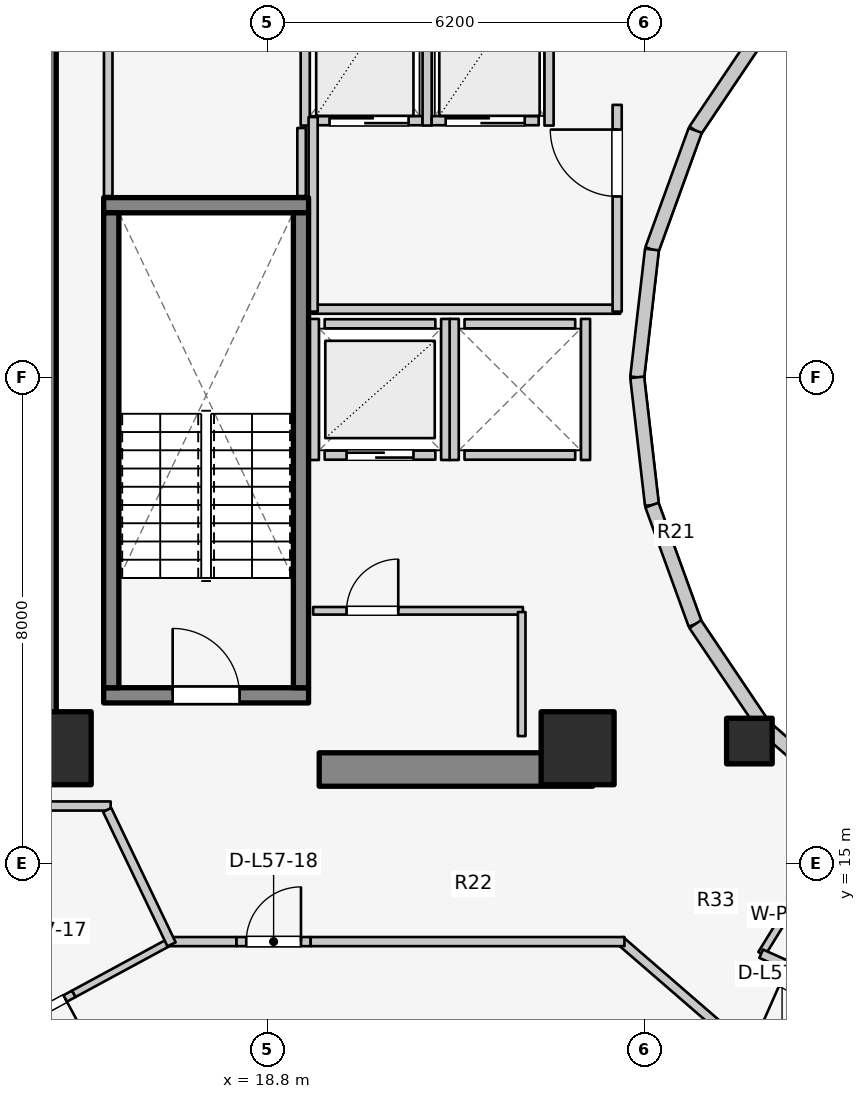
"""IFC4 building model, lengths in metres.
Left out: names, types, materials, properties, quantities, classifications, styles, units other than length and angle.
Written with IfcOpenShell. Run it as: python <this file> out.ifc"""

import sys

from ifc_helpers import new_model, si_unit, direction, frame, frame_2d, origin, origin_2d, place, context, subcontext, project, spatial, rectangle, extrude, element, fill, save


model = new_model("IFC4")
c1 = context("Model", 3, precision=1e-05, world=origin(), true_north=direction((0.0, 1.0)))
c2 = subcontext(c1, "Body", "Model", "MODEL_VIEW")
j1 = project(units=[si_unit("LENGTHUNIT", "METRE"), si_unit("PLANEANGLEUNIT", "RADIAN")], contexts=[c1])
p1 = place(None, origin())
s1 = spatial("IfcSite", under=j1, at=p1, CompositionType="ELEMENT")
p2 = place(p1, origin())
s2 = spatial("IfcBuilding", under=s1, at=p2, CompositionType="ELEMENT")
p3 = place(p2, frame((0.0, 0.0, 187.0)))
s3 = spatial("IfcBuildingStorey", under=s2, at=p3, CompositionType="ELEMENT", Elevation=187.0)
p4 = place(p3, frame((15.05, 17.05, 0.0), z_axis=(0.0, 0.0, 1.0), x_axis=(0.0, 1.0, 0.0)))
e1 = element("IfcWall", 1, at=p4, inside=s3, PredefinedType="SHEAR", context=c2, shape_type="SweptSolid", body=[
    extrude(rectangle(XDim=12.8, YDim=0.55, at=frame_2d((6.4, 0.0))), origin(), (0.0, 0.0, 1.0), 3.1),
])
p5 = place(p3, frame((19.65, 16.55, 0.0), z_axis=(0.0, 0.0, 1.0), x_axis=(1.0, 0.0, 0.0)))
e2 = element("IfcWall", 2, at=p5, inside=s3, PredefinedType="SHEAR", context=c2, shape_type="SweptSolid", body=[
    extrude(rectangle(XDim=4.5, YDim=0.55, at=frame_2d((2.25, 0.0))), origin(), (0.0, 0.0, 1.0), 3.1),
])
p6 = place(p3, frame((16.105, 17.77, 0.0), z_axis=(0.0, 0.0, 1.0), x_axis=(1.0, 0.0, 0.0)))
e3 = element("IfcWall", 3, at=p6, inside=s3, PredefinedType="SOLIDWALL", context=c2, shape_type="SweptSolid", body=[
    extrude(rectangle(XDim=3.37, YDim=0.25, at=frame_2d((1.685, 0.0))), origin(), (0.0, 0.0, 1.0), 3.1),
])
p7 = place(p6, frame((1.135, 0.0, 0.0)))
e4 = element("IfcOpeningElement", 4, at=p7, cuts=e3, PredefinedType="OPENING", context=c2, shape_type="SweptSolid", body=[
    extrude(rectangle(XDim=1.1, YDim=2.1, at=frame_2d((0.55, 1.05))), frame((0.0, 0.135, 0.0), z_axis=(0.0, -1.0, 0.0), x_axis=(1.0, 0.0, 0.0)), (0.0, 0.0, 1.0), 0.27),
])
p8 = place(p3, frame((16.105, 25.83, 0.0), z_axis=(0.0, 0.0, 1.0), x_axis=(1.0, 0.0, 0.0)))
e5 = element("IfcWall", 5, at=p8, inside=s3, PredefinedType="SOLIDWALL", context=c2, shape_type="SweptSolid", body=[
    extrude(rectangle(XDim=3.37, YDim=0.25, at=frame_2d((1.685, 0.0))), origin(), (0.0, 0.0, 1.0), 3.1),
])
for number, where, z_axis, x_axis in (
    (6, (16.23, 17.895, 0.0), (0.0, 0.0, 1.0), (0.0, 1.0, 0.0)),
    (7, (19.35, 17.895, 0.0), (0.0, 0.0, 1.0), (0.0, 1.0, 0.0)),
):
    element("IfcWall", number, at=place(p3, frame(where, z_axis=z_axis, x_axis=x_axis)), inside=s3, PredefinedType="SOLIDWALL", context=c2, shape_type="SweptSolid", body=[
        extrude(rectangle(XDim=7.81, YDim=0.25, at=frame_2d((3.905, 0.0))), origin(), (0.0, 0.0, 1.0), 3.1),
    ])
for number, where, z_axis, x_axis in (
    (8, (15.3, 16.9, 0.0), (0.0, 0.0, 1.0), (1.0, 0.0, 0.0)),
    (9, (23.9, 16.9, 0.0), (0.0, 0.0, 1.0), (1.0, 0.0, 0.0)),
):
    element("IfcColumn", number, at=place(p3, frame(where, z_axis=z_axis, x_axis=x_axis)), inside=s3, PredefinedType="COLUMN", context=c2, shape_type="SweptSolid", body=[
        extrude(rectangle(XDim=1.2, YDim=1.2, at=origin_2d()), origin(), (0.0, 0.0, 1.0), 3.1),
    ])
p9 = place(p3, frame((26.725, 17.018, 0.0), z_axis=(0.0, 0.0, 1.0), x_axis=(1.0, 0.0, 0.0)))
e10 = element("IfcColumn", 10, at=p9, inside=s3, PredefinedType="COLUMN", context=c2, shape_type="SweptSolid", body=[
    extrude(rectangle(XDim=0.75, YDim=0.75, at=origin_2d()), origin(), (0.0, 0.0, 1.0), 3.1),
])
p10 = place(p3, frame((26.965, 28.742, 0.0), z_axis=(0.0, 0.0, 1.0), x_axis=(-0.558197800898, -0.829707909492, 0.0)))
e11 = element("IfcWall", 11, at=p10, inside=s3, PredefinedType="STANDARD", context=c2, shape_type="SweptSolid", body=[
    extrude(rectangle(XDim=2.027, YDim=0.23, at=frame_2d((1.013, 0.0))), origin(), (0.0, 0.0, 1.0), 1.22),
])
p11 = place(p3, frame((25.834, 27.06, 0.0), z_axis=(0.0, 0.0, 1.0), x_axis=(-0.341423187295, -0.93990968033, 0.0)))
e12 = element("IfcWall", 12, at=p11, inside=s3, PredefinedType="STANDARD", context=c2, shape_type="SweptSolid", body=[
    extrude(rectangle(XDim=2.084, YDim=0.23, at=frame_2d((1.042, 0.0))), origin(), (0.0, 0.0, 1.0), 2.56),
])
for number, where, z_axis, x_axis in (
    (13, (25.123, 25.102, 0.0), (0.0, 0.0, 1.0), (-0.115, -0.993, 0.0)),
    (14, (24.88, 23.0, 0.0), (0.0, 0.0, 1.0), (0.115, -0.993, 0.0)),
):
    element("IfcWall", number, at=place(p3, frame(where, z_axis=z_axis, x_axis=x_axis)), inside=s3, PredefinedType="STANDARD", context=c2, shape_type="SweptSolid", body=[
        extrude(rectangle(XDim=2.115, YDim=0.23, at=frame_2d((1.058, 0.0))), origin(), (0.0, 0.0, 1.0), 2.56),
    ])
p12 = place(p3, frame((25.123, 20.898, 0.0), z_axis=(0.0, 0.0, 1.0), x_axis=(0.341423187295, -0.93990968033, 0.0)))
e15 = element("IfcWall", 15, at=p12, inside=s3, PredefinedType="STANDARD", context=c2, shape_type="SweptSolid", body=[
    extrude(rectangle(XDim=2.084, YDim=0.23, at=frame_2d((1.042, 0.0))), origin(), (0.0, 0.0, 1.0), 2.56),
])
p13 = place(p3, frame((25.834, 18.94, 0.0), z_axis=(0.0, 0.0, 1.0), x_axis=(0.558197800898, -0.829707909492, 0.0)))
e16 = element("IfcWall", 16, at=p13, inside=s3, PredefinedType="STANDARD", context=c2, shape_type="SweptSolid", body=[
    extrude(rectangle(XDim=2.027, YDim=0.23, at=frame_2d((1.013, 0.0))), origin(), (0.0, 0.0, 1.0), 1.22),
])
p14 = place(p3, frame((26.965, 17.258, 0.0), z_axis=(0.0, 0.0, 1.0), x_axis=(0.752576694707, -0.658504607869, 0.0)))
e17 = element("IfcWall", 17, at=p14, inside=s3, PredefinedType="STANDARD", context=c2, shape_type="SweptSolid", body=[
    extrude(rectangle(XDim=1.959, YDim=0.23, at=frame_2d((0.98, 0.0))), origin(), (0.0, 0.0, 1.0), 1.22),
])
p15 = place(p3, frame((12.381, 13.716, 0.0), z_axis=(0.0, 0.0, 1.0), x_axis=(0.727667301037, -0.68593024354, 0.0)))
e18 = element("IfcWall", 18, at=p15, inside=s3, PredefinedType="STANDARD", context=c2, shape_type="SweptSolid", body=[
    extrude(rectangle(XDim=4.604, YDim=0.26, at=frame_2d((2.302, 0.0))), origin(), (0.0, 0.0, 1.0), 1.22),
])
p16 = place(p15, frame((0.631, 0.0, 0.15)))
e19 = element("IfcOpeningElement", 19, at=p16, cuts=e18, PredefinedType="OPENING", context=c2, shape_type="SweptSolid", body=[
    extrude(rectangle(XDim=1.2, YDim=0.9, at=frame_2d((0.6, 0.45))), frame((0.0, 0.14, 0.0), z_axis=(0.0, -1.0, 0.0), x_axis=(1.0, 0.0, 0.0)), (0.0, 0.0, 1.0), 0.28),
])
p17 = place(p3, frame((19.74, 21.72, 0.0), z_axis=(0.0, 0.0, 1.0), x_axis=(1.0, 0.0, 0.0)))
e20 = element("IfcWall", 20, at=p17, inside=s3, PredefinedType="SOLIDWALL", context=c2, shape_type="SweptSolid", body=[
    extrude(rectangle(XDim=1.82, YDim=0.15, at=frame_2d((0.91, 0.0))), origin(), (0.0, 0.0, 1.0), 2.575),
])
p18 = place(p17, frame((0.36, 0.0, 0.0)))
e21 = element("IfcOpeningElement", 21, at=p18, cuts=e20, PredefinedType="OPENING", context=c2, shape_type="SweptSolid", body=[
    extrude(rectangle(XDim=1.1, YDim=2.1, at=frame_2d((0.55, 1.05))), frame((0.0, 0.085, 0.0), z_axis=(0.0, -1.0, 0.0), x_axis=(1.0, 0.0, 0.0)), (0.0, 0.0, 1.0), 0.17),
])
p19 = place(p3, frame((19.74, 23.88, 0.0), z_axis=(0.0, 0.0, 1.0), x_axis=(1.0, 0.0, 0.0)))
e22 = element("IfcWall", 22, at=p19, inside=s3, PredefinedType="SOLIDWALL", context=c2, shape_type="SweptSolid", body=[
    extrude(rectangle(XDim=1.82, YDim=0.15, at=frame_2d((0.91, 0.0))), origin(), (0.0, 0.0, 1.0), 2.575),
])
for number, where, z_axis, x_axis in (
    (23, (19.57, 21.64, 0.0), (0.0, 0.0, 1.0), (0.0, 1.0, 0.0)),
    (24, (21.73, 21.64, 0.0), (0.0, 0.0, 1.0), (0.0, 1.0, 0.0)),
):
    element("IfcWall", number, at=place(p3, frame(where, z_axis=z_axis, x_axis=x_axis)), inside=s3, PredefinedType="SOLIDWALL", context=c2, shape_type="SweptSolid", body=[
        extrude(rectangle(XDim=2.32, YDim=0.15, at=frame_2d((1.16, 0.0))), origin(), (0.0, 0.0, 1.0), 2.575),
    ])
for number, where, z_axis, x_axis in (
    (25, (22.04, 21.72, 0.0), (0.0, 0.0, 1.0), (1.0, 0.0, 0.0)),
    (26, (22.04, 23.88, 0.0), (0.0, 0.0, 1.0), (1.0, 0.0, 0.0)),
):
    element("IfcWall", number, at=place(p3, frame(where, z_axis=z_axis, x_axis=x_axis)), inside=s3, PredefinedType="SOLIDWALL", context=c2, shape_type="SweptSolid", body=[
        extrude(rectangle(XDim=1.82, YDim=0.15, at=frame_2d((0.91, 0.0))), origin(), (0.0, 0.0, 1.0), 2.12),
    ])
p20 = place(p3, frame((21.87, 21.64, 0.0), z_axis=(0.0, 0.0, 1.0), x_axis=(0.0, 1.0, 0.0)))
e27 = element("IfcWall", 27, at=p20, inside=s3, PredefinedType="SOLIDWALL", context=c2, shape_type="SweptSolid", body=[
    extrude(rectangle(XDim=2.32, YDim=0.15, at=frame_2d((1.16, 0.0))), origin(), (0.0, 0.0, 1.0), 2.575),
])
p21 = place(p3, frame((24.03, 21.64, 0.0), z_axis=(0.0, 0.0, 1.0), x_axis=(0.0, 1.0, 0.0)))
e28 = element("IfcWall", 28, at=p21, inside=s3, PredefinedType="SOLIDWALL", context=c2, shape_type="SweptSolid", body=[
    extrude(rectangle(XDim=2.32, YDim=0.15, at=frame_2d((1.16, 0.0))), origin(), (0.0, 0.0, 1.0), 2.12),
])
p22 = place(p3, frame((19.59, 27.22, 0.0), z_axis=(0.0, 0.0, 1.0), x_axis=(1.0, 0.0, 0.0)))
e29 = element("IfcWall", 29, at=p22, inside=s3, PredefinedType="SOLIDWALL", context=c2, shape_type="SweptSolid", body=[
    extrude(rectangle(XDim=1.76, YDim=0.15, at=frame_2d((0.88, 0.0))), origin(), (0.0, 0.0, 1.0), 2.575),
])
p23 = place(p22, frame((0.23, 0.0, 0.0)))
e30 = element("IfcOpeningElement", 30, at=p23, cuts=e29, PredefinedType="OPENING", context=c2, shape_type="SweptSolid", body=[
    extrude(rectangle(XDim=1.3, YDim=2.1, at=frame_2d((0.65, 1.05))), frame((0.0, 0.085, 0.0), z_axis=(0.0, -1.0, 0.0), x_axis=(1.0, 0.0, 0.0)), (0.0, 0.0, 1.0), 0.17),
])
for number, where, z_axis, x_axis in (
    (31, (19.42, 27.14, 0.0), (0.0, 0.0, 1.0), (0.0, 1.0, 0.0)),
    (32, (21.425, 27.14, 0.0), (0.0, 0.0, 1.0), (0.0, 1.0, 0.0)),
):
    element("IfcWall", number, at=place(p3, frame(where, z_axis=z_axis, x_axis=x_axis)), inside=s3, PredefinedType="SOLIDWALL", context=c2, shape_type="SweptSolid", body=[
        extrude(rectangle(XDim=2.72, YDim=0.15, at=frame_2d((1.36, 0.0))), origin(), (0.0, 0.0, 1.0), 2.575),
    ])
p24 = place(p3, frame((21.5, 27.22, 0.0), z_axis=(0.0, 0.0, 1.0), x_axis=(1.0, 0.0, 0.0)))
e33 = element("IfcWall", 33, at=p24, inside=s3, PredefinedType="SOLIDWALL", context=c2, shape_type="SweptSolid", body=[
    extrude(rectangle(XDim=1.76, YDim=0.15, at=frame_2d((0.88, 0.0))), origin(), (0.0, 0.0, 1.0), 2.575),
])
p25 = place(p24, frame((0.23, 0.0, 0.0)))
e34 = element("IfcOpeningElement", 34, at=p25, cuts=e33, PredefinedType="OPENING", context=c2, shape_type="SweptSolid", body=[
    extrude(rectangle(XDim=1.3, YDim=2.1, at=frame_2d((0.65, 1.05))), frame((0.0, 0.085, 0.0), z_axis=(0.0, -1.0, 0.0), x_axis=(1.0, 0.0, 0.0)), (0.0, 0.0, 1.0), 0.17),
])
p26 = place(p3, frame((23.43, 27.14, 0.0), z_axis=(0.0, 0.0, 1.0), x_axis=(0.0, 1.0, 0.0)))
e35 = element("IfcWall", 35, at=p26, inside=s3, PredefinedType="SOLIDWALL", context=c2, shape_type="SweptSolid", body=[
    extrude(rectangle(XDim=2.72, YDim=0.15, at=frame_2d((1.36, 0.0))), origin(), (0.0, 0.0, 1.0), 2.575),
])
p27 = place(p3, frame((19.52, 24.12, 0.0), z_axis=(0.0, 0.0, 1.0), x_axis=(1.0, 0.0, 0.0)))
e36 = element("IfcWall", 36, at=p27, inside=s3, PredefinedType="PARTITIONING", context=c2, shape_type="SweptSolid", body=[
    extrude(rectangle(XDim=5.08, YDim=0.15, at=frame_2d((2.54, 0.0))), origin(), (0.0, 0.0, 1.0), 2.12),
])
p28 = place(p3, frame((19.55, 24.08, 0.0), z_axis=(0.0, 0.0, 1.0), x_axis=(0.0, 1.0, 0.0)))
e37 = element("IfcWall", 37, at=p28, inside=s3, PredefinedType="PARTITIONING", context=c2, shape_type="SweptSolid", body=[
    extrude(rectangle(XDim=3.2, YDim=0.15, at=frame_2d((1.6, 0.0))), origin(), (0.0, 0.0, 1.0), 2.575),
])
p29 = place(p3, frame((24.55, 24.08, 0.0), z_axis=(0.0, 0.0, 1.0), x_axis=(0.0, 1.0, 0.0)))
e38 = element("IfcWall", 38, at=p29, inside=s3, PredefinedType="PARTITIONING", context=c2, shape_type="SweptSolid", body=[
    extrude(rectangle(XDim=3.4, YDim=0.15, at=frame_2d((1.7, 0.0))), origin(), (0.0, 0.0, 1.0), 2.575),
])
p30 = place(p29, frame((1.894, 0.0, 0.0)))
e39 = element("IfcOpeningElement", 39, at=p30, cuts=e38, PredefinedType="OPENING", context=c2, shape_type="SweptSolid", body=[
    extrude(rectangle(XDim=1.1, YDim=2.1, at=frame_2d((0.55, 1.05))), frame((0.0, 0.085, 0.0), z_axis=(0.0, -1.0, 0.0), x_axis=(1.0, 0.0, 0.0)), (0.0, 0.0, 1.0), 0.17),
])
p31 = place(p3, frame((19.55, 19.16, 0.0), z_axis=(0.0, 0.0, 1.0), x_axis=(1.0, 0.0, 0.0)))
e40 = element("IfcWall", 40, at=p31, inside=s3, PredefinedType="PARTITIONING", context=c2, shape_type="SweptSolid", body=[
    extrude(rectangle(XDim=3.45, YDim=0.125, at=frame_2d((1.725, 0.0))), origin(), (0.0, 0.0, 1.0), 2.12),
])
p32 = place(p31, frame((0.55, 0.0, 0.0)))
e41 = element("IfcOpeningElement", 41, at=p32, cuts=e40, PredefinedType="OPENING", context=c2, shape_type="SweptSolid", body=[
    extrude(rectangle(XDim=0.85, YDim=2.05, at=frame_2d((0.425, 1.025))), frame((0.0, 0.073, 0.0), z_axis=(0.0, -1.0, 0.0), x_axis=(1.0, 0.0, 0.0)), (0.0, 0.0, 1.0), 0.145),
])
p33 = place(p3, frame((22.98, 17.1, 0.0), z_axis=(0.0, 0.0, 1.0), x_axis=(0.0, 1.0, 0.0)))
e42 = element("IfcWall", 42, at=p33, inside=s3, PredefinedType="PARTITIONING", context=c2, shape_type="SweptSolid", body=[
    extrude(rectangle(XDim=2.04, YDim=0.125, at=frame_2d((1.02, 0.0))), origin(), (0.0, 0.0, 1.0), 2.575),
])
p34 = place(p3, frame((16.18, 25.98, 0.0), z_axis=(0.0, 0.0, 1.0), x_axis=(0.0, 1.0, 0.0)))
e43 = element("IfcWall", 43, at=p34, inside=s3, PredefinedType="PLUMBINGWALL", context=c2, shape_type="SweptSolid", body=[
    extrude(rectangle(XDim=3.88, YDim=0.14, at=frame_2d((1.94, 0.0))), origin(), (0.0, 0.0, 1.0), 2.575),
])
p35 = place(p3, frame((19.36, 25.98, 0.0), z_axis=(0.0, 0.0, 1.0), x_axis=(0.0, 1.0, 0.0)))
e44 = element("IfcWall", 44, at=p35, inside=s3, PredefinedType="PLUMBINGWALL", context=c2, shape_type="SweptSolid", body=[
    extrude(rectangle(XDim=1.12, YDim=0.14, at=frame_2d((0.56, 0.0))), origin(), (0.0, 0.0, 1.0), 2.575),
])
p36 = place(p3, frame((10.96, 15.95, 0.0), z_axis=(0.0, 0.0, 1.0), x_axis=(1.0, 0.0, 0.0)))
e45 = element("IfcWall", 45, at=p36, inside=s3, PredefinedType="PARTITIONING", context=c2, shape_type="SweptSolid", body=[
    extrude(rectangle(XDim=5.26, YDim=0.15, at=frame_2d((2.63, 0.0))), origin(), (0.0, 0.0, 1.0), 1.22),
])
p37 = place(p3, frame((17.244, 13.744, 0.0), z_axis=(0.0, 0.0, 1.0), x_axis=(-0.879399863451, -0.476083900339, 0.0)))
e46 = element("IfcWall", 46, at=p37, inside=s3, PredefinedType="MOVABLE", context=c2, shape_type="SweptSolid", body=[
    extrude(rectangle(XDim=1.855, YDim=0.12, at=frame_2d((0.928, 0.0))), origin(), (0.0, 0.0, 1.0), 1.22),
])
p38 = place(p3, frame((15.612, 12.861, 0.0), z_axis=(0.0, 0.0, 1.0), x_axis=(-0.879342939039, -0.476189033433, 0.0)))
e47 = element("IfcWall", 47, at=p38, inside=s3, PredefinedType="MOVABLE", context=c2, shape_type="SweptSolid", body=[
    extrude(rectangle(XDim=1.17, YDim=0.12, at=frame_2d((0.585, 0.0))), origin(), (0.0, 0.0, 1.0), 2.11),
])
p39 = place(p38, frame((0.16, 0.0, 0.0)))
e48 = element("IfcOpeningElement", 48, at=p39, cuts=e47, PredefinedType="OPENING", context=c2, shape_type="SweptSolid", body=[
    extrude(rectangle(XDim=0.85, YDim=2.05, at=frame_2d((0.425, 1.025))), frame((0.0, 0.07, 0.0), z_axis=(0.0, -1.0, 0.0), x_axis=(1.0, 0.0, 0.0)), (0.0, 0.0, 1.0), 0.14),
])
p40 = place(p3, frame((26.193, 12.358, 0.0), z_axis=(0.0, 0.0, 1.0), x_axis=(-0.756055312247, 0.654507727092, 0.0)))
e49 = element("IfcWall", 49, at=p40, inside=s3, PredefinedType="PARTITIONING", context=c2, shape_type="SweptSolid", body=[
    extrude(rectangle(XDim=2.111, YDim=0.15, at=frame_2d((1.055, 0.0))), origin(), (0.0, 0.0, 1.0), 1.22),
])
p41 = place(p3, frame((17.15, 13.72, 0.0), z_axis=(0.0, 0.0, 1.0), x_axis=(1.0, 0.0, 0.0)))
e50 = element("IfcWall", 50, at=p41, inside=s3, PredefinedType="PARTITIONING", context=c2, shape_type="SweptSolid", body=[
    extrude(rectangle(XDim=1.14, YDim=0.15, at=frame_2d((0.57, 0.0))), origin(), (0.0, 0.0, 1.0), 2.575),
])
p42 = place(p3, frame((18.29, 13.72, 0.0), z_axis=(0.0, 0.0, 1.0), x_axis=(1.0, 0.0, 0.0)))
e51 = element("IfcWall", 51, at=p42, inside=s3, PredefinedType="PARTITIONING", context=c2, shape_type="SweptSolid", body=[
    extrude(rectangle(XDim=1.22, YDim=0.15, at=frame_2d((0.61, 0.0))), origin(), (0.0, 0.0, 1.0), 2.575),
])
p43 = place(p42, frame((0.16, 0.0, 0.0)))
e52 = element("IfcOpeningElement", 52, at=p43, cuts=e51, PredefinedType="OPENING", context=c2, shape_type="SweptSolid", body=[
    extrude(rectangle(XDim=0.9, YDim=2.1, at=frame_2d((0.45, 1.05))), frame((0.0, 0.085, 0.0), z_axis=(0.0, -1.0, 0.0), x_axis=(1.0, 0.0, 0.0)), (0.0, 0.0, 1.0), 0.17),
])
p44 = place(p3, frame((19.51, 13.72, 0.0), z_axis=(0.0, 0.0, 1.0), x_axis=(1.0, 0.0, 0.0)))
e53 = element("IfcWall", 53, at=p44, inside=s3, PredefinedType="PARTITIONING", context=c2, shape_type="SweptSolid", body=[
    extrude(rectangle(XDim=5.16, YDim=0.15, at=frame_2d((2.58, 0.0))), origin(), (0.0, 0.0, 1.0), 1.22),
])
p45 = place(p3, frame((17.222, 13.675, 0.0), z_axis=(0.0, 0.0, 1.0), x_axis=(-0.431973389813, 0.901886351207, 0.0)))
e54 = element("IfcWall", 54, at=p45, inside=s3, PredefinedType="PARTITIONING", context=c2, shape_type="SweptSolid", body=[
    extrude(rectangle(XDim=2.452, YDim=0.15, at=frame_2d((1.226, 0.0))), origin(), (0.0, 0.0, 1.0), 2.575),
])
p46 = place(p3, frame((28.45, 15.985, 0.0), z_axis=(0.0, 0.0, 1.0), x_axis=(-0.525627246902, -0.850714991824, 0.0)))
e55 = element("IfcWall", 55, at=p46, inside=s3, PredefinedType="PARTITIONING", context=c2, shape_type="SweptSolid", body=[
    extrude(rectangle(XDim=2.901, YDim=0.125, at=frame_2d((1.451, 0.0))), origin(), (0.0, 0.0, 1.0), 1.22),
])
p47 = place(p3, frame((26.919, 13.521, 0.0), z_axis=(0.0, 0.0, 1.0), x_axis=(0.912888568324, -0.408208845842, 0.0)))
e56 = element("IfcWall", 56, at=p47, inside=s3, PredefinedType="PARTITIONING", context=c2, shape_type="SweptSolid", body=[
    extrude(rectangle(XDim=2.69, YDim=0.15, at=frame_2d((1.345, 0.0))), origin(), (0.0, 0.0, 1.0), 1.22),
])
p48 = place(p7, origin())
e57 = element("IfcDoor", 57, at=p48, inside=s3, OperationType="SINGLE_SWING_LEFT", PredefinedType="DOOR", context=c2, shape_type="SweptSolid", body=[
    extrude(rectangle(XDim=1.1, YDim=2.1, at=frame_2d((0.55, 1.05))), frame((0.0, 0.025, 0.0), z_axis=(0.0, -1.0, 0.0), x_axis=(1.0, 0.0, 0.0)), (0.0, 0.0, 1.0), 0.05),
])
fill(e4, e57)
p49 = place(p18, origin())
e58 = element("IfcDoor", 58, at=p49, inside=s3, OperationType="DOUBLE_DOOR_SLIDING", PredefinedType="DOOR", context=c2, shape_type="SweptSolid", body=[
    extrude(rectangle(XDim=1.1, YDim=2.1, at=frame_2d((0.55, 1.05))), frame((0.0, 0.025, 0.0), z_axis=(0.0, -1.0, 0.0), x_axis=(1.0, 0.0, 0.0)), (0.0, 0.0, 1.0), 0.05),
])
fill(e21, e58)
p50 = place(p23, origin())
e59 = element("IfcDoor", 59, at=p50, inside=s3, OperationType="DOUBLE_DOOR_SLIDING", PredefinedType="DOOR", context=c2, shape_type="SweptSolid", body=[
    extrude(rectangle(XDim=1.3, YDim=2.1, at=frame_2d((0.65, 1.05))), frame((0.0, 0.025, 0.0), z_axis=(0.0, -1.0, 0.0), x_axis=(1.0, 0.0, 0.0)), (0.0, 0.0, 1.0), 0.05),
])
fill(e30, e59)
p51 = place(p25, origin())
e60 = element("IfcDoor", 60, at=p51, inside=s3, OperationType="DOUBLE_DOOR_SLIDING", PredefinedType="DOOR", context=c2, shape_type="SweptSolid", body=[
    extrude(rectangle(XDim=1.3, YDim=2.1, at=frame_2d((0.65, 1.05))), frame((0.0, 0.025, 0.0), z_axis=(0.0, -1.0, 0.0), x_axis=(1.0, 0.0, 0.0)), (0.0, 0.0, 1.0), 0.05),
])
fill(e34, e60)
p52 = place(p30, origin())
e61 = element("IfcDoor", 61, at=p52, inside=s3, OperationType="SINGLE_SWING_RIGHT", PredefinedType="DOOR", context=c2, shape_type="SweptSolid", body=[
    extrude(rectangle(XDim=1.1, YDim=2.1, at=frame_2d((0.55, 1.05))), frame((0.0, 0.025, 0.0), z_axis=(0.0, -1.0, 0.0), x_axis=(1.0, 0.0, 0.0)), (0.0, 0.0, 1.0), 0.05),
])
fill(e39, e61)
p53 = place(p32, origin())
e62 = element("IfcDoor", 62, at=p53, inside=s3, OperationType="SINGLE_SWING_RIGHT", PredefinedType="DOOR", context=c2, shape_type="SweptSolid", body=[
    extrude(rectangle(XDim=0.85, YDim=2.05, at=frame_2d((0.425, 1.025))), frame((0.0, 0.025, 0.0), z_axis=(0.0, -1.0, 0.0), x_axis=(1.0, 0.0, 0.0)), (0.0, 0.0, 1.0), 0.05),
])
fill(e41, e62)
p54 = place(p39, origin())
e63 = element("IfcDoor", 63, at=p54, inside=s3, OperationType="SINGLE_SWING_LEFT", PredefinedType="DOOR", context=c2, shape_type="SweptSolid", body=[
    extrude(rectangle(XDim=0.85, YDim=2.05, at=frame_2d((0.425, 1.025))), frame((0.0, 0.025, 0.0), z_axis=(0.0, -1.0, 0.0), x_axis=(1.0, 0.0, 0.0)), (0.0, 0.0, 1.0), 0.05),
])
fill(e48, e63)
p55 = place(p43, origin())
e64 = element("IfcDoor", 64, at=p55, inside=s3, OperationType="SINGLE_SWING_RIGHT", PredefinedType="DOOR", context=c2, shape_type="SweptSolid", body=[
    extrude(rectangle(XDim=0.9, YDim=2.1, at=frame_2d((0.45, 1.05))), frame((0.0, 0.025, 0.0), z_axis=(0.0, -1.0, 0.0), x_axis=(1.0, 0.0, 0.0)), (0.0, 0.0, 1.0), 0.05),
])
fill(e52, e64)
save(model, sys.argv[1])
